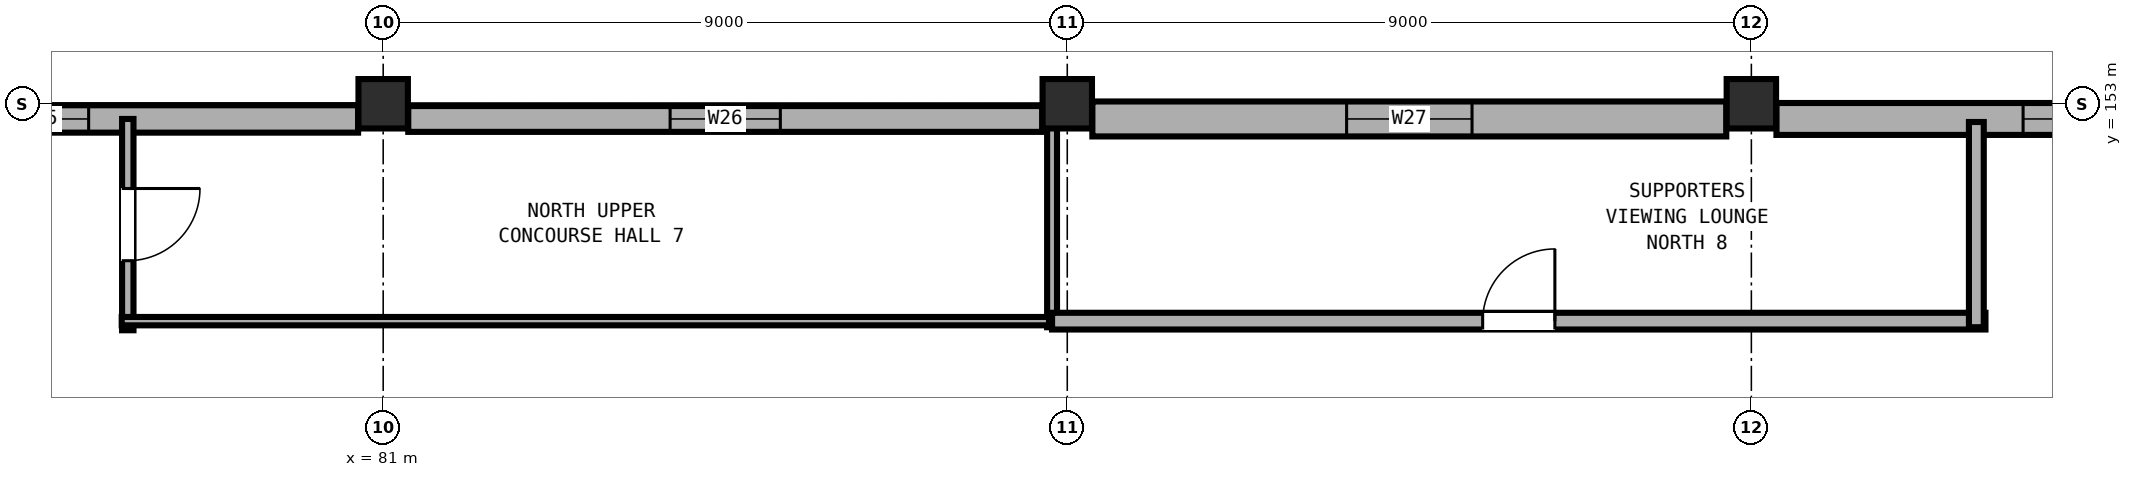
"""IFC4 building model, lengths in metres.
Left out: names, types, materials, properties, quantities, classifications, styles, units other than length and angle.
Written with IfcOpenShell. Run it as: python <this file> out.ifc"""

import sys

from ifc_helpers import new_model, si_unit, direction, frame, frame_2d, origin, origin_2d, place, context, subcontext, project, spatial, rectangle, extrude, element, fill, save


model = new_model("IFC4")
c1 = context("Model", 3, precision=1e-05, world=origin(), true_north=direction((0.0, 1.0)))
c2 = subcontext(c1, "Body", "Model", "MODEL_VIEW")
j1 = project(units=[si_unit("LENGTHUNIT", "METRE"), si_unit("PLANEANGLEUNIT", "RADIAN")], contexts=[c1])
p1 = place(None, origin())
s1 = spatial("IfcSite", under=j1, at=p1, CompositionType="ELEMENT")
p2 = place(p1, origin())
s2 = spatial("IfcBuilding", under=s1, at=p2, CompositionType="ELEMENT")
p3 = place(p2, frame((0.0, 0.0, 14.4)))
s3 = spatial("IfcBuildingStorey", under=s2, at=p3, CompositionType="ELEMENT", Elevation=14.4)
for number, where, z_axis, x_axis in (
    (1, (81.0, 153.0, 0.0), (0.0, 0.0, 1.0), (1.0, 0.0, 0.0)),
    (2, (90.0, 153.0, 0.0), (0.0, 0.0, 1.0), (1.0, 0.0, 0.0)),
    (3, (99.0, 153.0, 0.0), (0.0, 0.0, 1.0), (1.0, 0.0, 0.0)),
):
    element("IfcColumn", number, at=place(p3, frame(where, z_axis=z_axis, x_axis=x_axis)), inside=s3, PredefinedType="COLUMN", context=c2, shape_type="SweptSolid", body=[
        extrude(rectangle(XDim=0.65, YDim=0.65, at=origin_2d()), origin(), (0.0, 0.0, 1.0), 4.8),
    ])
p4 = place(p3, frame((72.33, 152.8, 0.0), z_axis=(0.0, 0.0, 1.0), x_axis=(1.0, 0.0, 0.0)))
e4 = element("IfcWall", 4, at=p4, inside=s3, PredefinedType="SOLIDWALL", context=c2, shape_type="SweptSolid", body=[
    extrude(rectangle(XDim=8.34, YDim=0.36, at=frame_2d((4.17, 0.0))), origin(), (0.0, 0.0, 1.0), 3.58),
])
p5 = place(p4, frame((3.545, 0.0, 0.9)))
e5 = element("IfcOpeningElement", 5, at=p5, cuts=e4, PredefinedType="OPENING", context=c2, shape_type="SweptSolid", body=[
    extrude(rectangle(XDim=1.25, YDim=1.8, at=frame_2d((0.625, 0.9))), frame((0.0, 0.19, 0.0), z_axis=(0.0, -1.0, 0.0), x_axis=(1.0, 0.0, 0.0)), (0.0, 0.0, 1.0), 0.38),
])
p6 = place(p3, frame((81.33, 152.8, 0.0), z_axis=(0.0, 0.0, 1.0), x_axis=(1.0, 0.0, 0.0)))
e6 = element("IfcWall", 6, at=p6, inside=s3, PredefinedType="SOLIDWALL", context=c2, shape_type="SweptSolid", body=[
    extrude(rectangle(XDim=8.34, YDim=0.34, at=frame_2d((4.17, 0.0))), origin(), (0.0, 0.0, 1.0), 3.58),
])
p7 = place(p6, frame((3.445, 0.0, 0.9)))
e7 = element("IfcOpeningElement", 7, at=p7, cuts=e6, PredefinedType="OPENING", context=c2, shape_type="SweptSolid", body=[
    extrude(rectangle(XDim=1.45, YDim=1.85, at=frame_2d((0.725, 0.925))), frame((0.0, 0.18, 0.0), z_axis=(0.0, -1.0, 0.0), x_axis=(1.0, 0.0, 0.0)), (0.0, 0.0, 1.0), 0.36),
])
p8 = place(p3, frame((90.33, 152.8, 0.0), z_axis=(0.0, 0.0, 1.0), x_axis=(1.0, 0.0, 0.0)))
e8 = element("IfcWall", 8, at=p8, inside=s3, PredefinedType="SOLIDWALL", context=c2, shape_type="SweptSolid", body=[
    extrude(rectangle(XDim=8.34, YDim=0.46, at=frame_2d((4.17, 0.0))), origin(), (0.0, 0.0, 1.0), 3.58),
])
p9 = place(p8, frame((3.345, 0.0, 0.9)))
e9 = element("IfcOpeningElement", 9, at=p9, cuts=e8, PredefinedType="OPENING", context=c2, shape_type="SweptSolid", body=[
    extrude(rectangle(XDim=1.65, YDim=1.9, at=frame_2d((0.825, 0.95))), frame((0.0, 0.24, 0.0), z_axis=(0.0, -1.0, 0.0), x_axis=(1.0, 0.0, 0.0)), (0.0, 0.0, 1.0), 0.48),
])
p10 = place(p3, frame((99.33, 152.8, 0.0), z_axis=(0.0, 0.0, 1.0), x_axis=(1.0, 0.0, 0.0)))
e10 = element("IfcWall", 10, at=p10, inside=s3, PredefinedType="SOLIDWALL", context=c2, shape_type="SweptSolid", body=[
    extrude(rectangle(XDim=8.34, YDim=0.42, at=frame_2d((4.17, 0.0))), origin(), (0.0, 0.0, 1.0), 3.58),
])
p11 = place(p10, frame((3.245, 0.0, 0.9)))
e11 = element("IfcOpeningElement", 11, at=p11, cuts=e10, PredefinedType="OPENING", context=c2, shape_type="SweptSolid", body=[
    extrude(rectangle(XDim=1.85, YDim=1.95, at=frame_2d((0.925, 0.975))), frame((0.0, 0.22, 0.0), z_axis=(0.0, -1.0, 0.0), x_axis=(1.0, 0.0, 0.0)), (0.0, 0.0, 1.0), 0.44),
])
p12 = place(p3, frame((77.64, 152.8, 0.0), z_axis=(0.0, 0.0, 1.0), x_axis=(0.0, -1.0, 0.0)))
e12 = element("IfcWall", 12, at=p12, inside=s3, PredefinedType="PARTITIONING", context=c2, shape_type="SweptSolid", body=[
    extrude(rectangle(XDim=2.78, YDim=0.15, at=frame_2d((1.39, 0.0))), origin(), (0.0, 0.0, 1.0), 3.56),
])
p13 = place(p12, frame((0.915, 0.0, 0.0)))
e13 = element("IfcOpeningElement", 13, at=p13, cuts=e12, PredefinedType="OPENING", context=c2, shape_type="SweptSolid", body=[
    extrude(rectangle(XDim=0.95, YDim=2.1, at=frame_2d((0.475, 1.05))), frame((0.0, 0.085, 0.0), z_axis=(0.0, -1.0, 0.0), x_axis=(1.0, 0.0, 0.0)), (0.0, 0.0, 1.0), 0.17),
])
p14 = place(p3, frame((89.8, 152.76, 0.0), z_axis=(0.0, 0.0, 1.0), x_axis=(0.0, -1.0, 0.0)))
e14 = element("IfcWall", 14, at=p14, inside=s3, PredefinedType="PARTITIONING", context=c2, shape_type="SweptSolid", body=[
    extrude(rectangle(XDim=2.7, YDim=0.13, at=frame_2d((1.35, 0.0))), origin(), (0.0, 0.0, 1.0), 3.56),
])
p15 = place(p3, frame((89.76, 150.14, 0.0), z_axis=(0.0, 0.0, 1.0), x_axis=(-1.0, 0.0, 0.0)))
e15 = element("IfcWall", 15, at=p15, inside=s3, PredefinedType="PARTITIONING", context=c2, shape_type="SweptSolid", body=[
    extrude(rectangle(XDim=12.2, YDim=0.11, at=frame_2d((6.1, 0.0))), origin(), (0.0, 0.0, 1.0), 3.56),
])
p16 = place(p3, frame((89.8, 150.14, 0.0), z_axis=(0.0, 0.0, 1.0), x_axis=(1.0, 0.0, 0.0)))
e16 = element("IfcWall", 16, at=p16, inside=s3, PredefinedType="PARTITIONING", context=c2, shape_type="SweptSolid", body=[
    extrude(rectangle(XDim=12.28, YDim=0.22, at=frame_2d((6.14, 0.0))), origin(), (0.0, 0.0, 1.0), 3.56),
])
p17 = place(p16, frame((5.665, 0.0, 0.0)))
e17 = element("IfcOpeningElement", 17, at=p17, cuts=e16, PredefinedType="OPENING", context=c2, shape_type="SweptSolid", body=[
    extrude(rectangle(XDim=0.95, YDim=2.18, at=frame_2d((0.475, 1.09))), frame((0.0, 0.12, 0.0), z_axis=(0.0, -1.0, 0.0), x_axis=(1.0, 0.0, 0.0)), (0.0, 0.0, 1.0), 0.24),
])
p18 = place(p3, frame((101.96, 152.76, 0.0), z_axis=(0.0, 0.0, 1.0), x_axis=(0.0, -1.0, 0.0)))
e18 = element("IfcWall", 18, at=p18, inside=s3, PredefinedType="PARTITIONING", context=c2, shape_type="SweptSolid", body=[
    extrude(rectangle(XDim=2.7, YDim=0.195, at=frame_2d((1.35, 0.0))), origin(), (0.0, 0.0, 1.0), 3.56),
])
p19 = place(p5, origin())
e19 = element("IfcWindow", 19, at=p19, inside=s3, PartitioningType="SINGLE_PANEL", PredefinedType="WINDOW", context=c2, shape_type="SweptSolid", body=[
    extrude(rectangle(XDim=1.25, YDim=1.8, at=frame_2d((0.625, 0.9))), frame((0.0, 0.03, 0.0), z_axis=(0.0, -1.0, 0.0), x_axis=(1.0, 0.0, 0.0)), (0.0, 0.0, 1.0), 0.06),
])
fill(e5, e19)
p20 = place(p7, origin())
e20 = element("IfcWindow", 20, at=p20, inside=s3, PartitioningType="SINGLE_PANEL", PredefinedType="WINDOW", context=c2, shape_type="SweptSolid", body=[
    extrude(rectangle(XDim=1.45, YDim=1.85, at=frame_2d((0.725, 0.925))), frame((0.0, 0.03, 0.0), z_axis=(0.0, -1.0, 0.0), x_axis=(1.0, 0.0, 0.0)), (0.0, 0.0, 1.0), 0.06),
])
fill(e7, e20)
p21 = place(p9, origin())
e21 = element("IfcWindow", 21, at=p21, inside=s3, PartitioningType="SINGLE_PANEL", PredefinedType="WINDOW", context=c2, shape_type="SweptSolid", body=[
    extrude(rectangle(XDim=1.65, YDim=1.9, at=frame_2d((0.825, 0.95))), frame((0.0, 0.03, 0.0), z_axis=(0.0, -1.0, 0.0), x_axis=(1.0, 0.0, 0.0)), (0.0, 0.0, 1.0), 0.06),
])
fill(e9, e21)
p22 = place(p11, origin())
e22 = element("IfcWindow", 22, at=p22, inside=s3, PartitioningType="DOUBLE_PANEL_VERTICAL", PredefinedType="WINDOW", context=c2, shape_type="SweptSolid", body=[
    extrude(rectangle(XDim=1.85, YDim=1.95, at=frame_2d((0.925, 0.975))), frame((0.0, 0.03, 0.0), z_axis=(0.0, -1.0, 0.0), x_axis=(1.0, 0.0, 0.0)), (0.0, 0.0, 1.0), 0.06),
])
fill(e11, e22)
p23 = place(p13, origin())
e23 = element("IfcDoor", 23, at=p23, inside=s3, OperationType="SINGLE_SWING_LEFT", PredefinedType="DOOR", context=c2, shape_type="SweptSolid", body=[
    extrude(rectangle(XDim=0.95, YDim=2.1, at=frame_2d((0.475, 1.05))), frame((0.0, 0.025, 0.0), z_axis=(0.0, -1.0, 0.0), x_axis=(1.0, 0.0, 0.0)), (0.0, 0.0, 1.0), 0.05),
])
fill(e13, e23)
p24 = place(p17, origin())
e24 = element("IfcDoor", 24, at=p24, inside=s3, OperationType="SINGLE_SWING_RIGHT", PredefinedType="DOOR", context=c2, shape_type="SweptSolid", body=[
    extrude(rectangle(XDim=0.95, YDim=2.18, at=frame_2d((0.475, 1.09))), frame((0.0, 0.025, 0.0), z_axis=(0.0, -1.0, 0.0), x_axis=(1.0, 0.0, 0.0)), (0.0, 0.0, 1.0), 0.05),
])
fill(e17, e24)
save(model, sys.argv[1])
